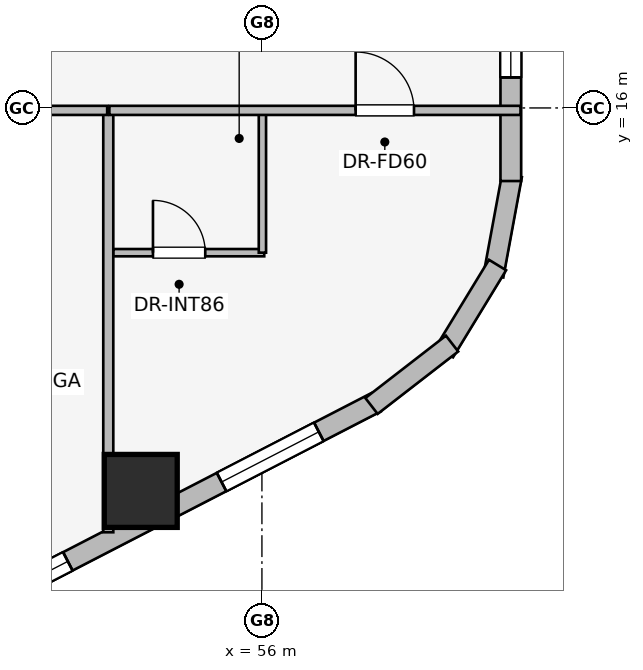
"""IFC4 building model, lengths in metres.
Left out: names, types, materials, properties, quantities, classifications, styles, units other than length and angle.
Written with IfcOpenShell. Run it as: python <this file> out.ifc"""

import sys

from ifc_helpers import new_model, si_unit, direction, frame, frame_2d, origin, origin_2d, place, context, subcontext, project, spatial, rectangle, extrude, element, fill, save


model = new_model("IFC4")
c1 = context("Model", 3, precision=1e-05, world=origin(), true_north=direction((0.0, 1.0)))
c2 = subcontext(c1, "Body", "Model", "MODEL_VIEW")
j1 = project(units=[si_unit("LENGTHUNIT", "METRE"), si_unit("PLANEANGLEUNIT", "RADIAN")], contexts=[c1])
p1 = place(None, origin())
s1 = spatial("IfcSite", under=j1, at=p1, CompositionType="ELEMENT")
p2 = place(p1, origin())
s2 = spatial("IfcBuilding", under=s1, at=p2, CompositionType="ELEMENT")
p3 = place(p2, frame((0.0, 0.0, 85.4)))
s3 = spatial("IfcBuildingStorey", under=s2, at=p3, CompositionType="ELEMENT", Elevation=85.4)
p4 = place(p3, frame((54.007, 9.702, 0.0), z_axis=(0.0, 0.0, 1.0), x_axis=(1.0, 0.0, 0.0)))
e1 = element("IfcColumn", 1, at=p4, inside=s3, PredefinedType="COLUMN", context=c2, shape_type="SweptSolid", body=[
    extrude(rectangle(XDim=1.2, YDim=1.2, at=origin_2d()), origin(), (0.0, 0.0, 1.0), 3.65),
])
p5 = place(p3, frame((57.876, 11.159, 0.0), z_axis=(0.0, 0.0, 1.0), x_axis=(-0.888634413993, -0.458616264721, 0.0)))
e2 = element("IfcWall", 2, at=p5, inside=s3, PredefinedType="STANDARD", context=c2, shape_type="SweptSolid", body=[
    extrude(rectangle(XDim=20.531, YDim=0.34, at=frame_2d((10.266, 0.0))), origin(), (0.0, 0.0, 1.0), 2.684),
])
p6 = place(p5, frame((1.058, 0.0, 0.75)))
e3 = element("IfcOpeningElement", 3, at=p6, cuts=e2, PredefinedType="OPENING", context=c2, shape_type="SweptSolid", body=[
    extrude(rectangle(XDim=1.8, YDim=1.5, at=frame_2d((0.9, 0.75))), frame((0.0, 0.18, 0.0), z_axis=(0.0, -1.0, 0.0), x_axis=(1.0, 0.0, 0.0)), (0.0, 0.0, 1.0), 0.36),
])
p7 = place(p5, frame((5.703, 0.0, 0.75)))
e4 = element("IfcOpeningElement", 4, at=p7, cuts=e2, PredefinedType="OPENING", context=c2, shape_type="SweptSolid", body=[
    extrude(rectangle(XDim=1.5, YDim=1.5, at=frame_2d((0.75, 0.75))), frame((0.0, 0.18, 0.0), z_axis=(0.0, -1.0, 0.0), x_axis=(1.0, 0.0, 0.0)), (0.0, 0.0, 1.0), 0.36),
])
p8 = place(p5, frame((8.099, 0.0, 0.75)))
e5 = element("IfcOpeningElement", 5, at=p8, cuts=e2, PredefinedType="OPENING", context=c2, shape_type="SweptSolid", body=[
    extrude(rectangle(XDim=1.5, YDim=1.5, at=frame_2d((0.75, 0.75))), frame((0.0, 0.18, 0.0), z_axis=(0.0, -1.0, 0.0), x_axis=(1.0, 0.0, 0.0)), (0.0, 0.0, 1.0), 0.36),
])
p9 = place(p5, frame((10.495, 0.0, 0.75)))
e6 = element("IfcOpeningElement", 6, at=p9, cuts=e2, PredefinedType="OPENING", context=c2, shape_type="SweptSolid", body=[
    extrude(rectangle(XDim=1.5, YDim=1.5, at=frame_2d((0.75, 0.75))), frame((0.0, 0.18, 0.0), z_axis=(0.0, -1.0, 0.0), x_axis=(1.0, 0.0, 0.0)), (0.0, 0.0, 1.0), 0.36),
])
p10 = place(p5, frame((13.526, 0.0, 0.75)))
e7 = element("IfcOpeningElement", 7, at=p10, cuts=e2, PredefinedType="OPENING", context=c2, shape_type="SweptSolid", body=[
    extrude(rectangle(XDim=1.8, YDim=1.5, at=frame_2d((0.9, 0.75))), frame((0.0, 0.18, 0.0), z_axis=(0.0, -1.0, 0.0), x_axis=(1.0, 0.0, 0.0)), (0.0, 0.0, 1.0), 0.36),
])
p11 = place(p5, frame((17.823, 0.0, 0.75)))
e8 = element("IfcOpeningElement", 8, at=p11, cuts=e2, PredefinedType="OPENING", context=c2, shape_type="SweptSolid", body=[
    extrude(rectangle(XDim=1.5, YDim=1.5, at=frame_2d((0.75, 0.75))), frame((0.0, 0.18, 0.0), z_axis=(0.0, -1.0, 0.0), x_axis=(1.0, 0.0, 0.0)), (0.0, 0.0, 1.0), 0.36),
])
p12 = place(p3, frame((60.113, 14.892, 0.0), z_axis=(0.0, 0.0, 1.0), x_axis=(-0.181714143354, -0.983351397063, 0.0)))
e9 = element("IfcWall", 9, at=p12, inside=s3, PredefinedType="STANDARD", context=c2, shape_type="SweptSolid", body=[
    extrude(rectangle(XDim=1.678, YDim=0.33, at=frame_2d((0.839, 0.0))), origin(), (0.0, 0.0, 1.0), 3.39),
])
p13 = place(p3, frame((59.875, 13.417, 0.0), z_axis=(0.0, 0.0, 1.0), x_axis=(-0.520584129191, -0.853810379671, 0.0)))
e10 = element("IfcWall", 10, at=p13, inside=s3, PredefinedType="STANDARD", context=c2, shape_type="SweptSolid", body=[
    extrude(rectangle(XDim=1.677, YDim=0.33, at=frame_2d((0.838, 0.0))), origin(), (0.0, 0.0, 1.0), 3.39),
])
p14 = place(p3, frame((59.127, 12.125, 0.0), z_axis=(0.0, 0.0, 1.0), x_axis=(-0.790691856293, -0.61221433207, 0.0)))
e11 = element("IfcWall", 11, at=p14, inside=s3, PredefinedType="STANDARD", context=c2, shape_type="SweptSolid", body=[
    extrude(rectangle(XDim=1.676, YDim=0.33, at=frame_2d((0.838, 0.0))), origin(), (0.0, 0.0, 1.0), 3.39),
])
p15 = place(p3, frame((60.093, 33.202, 0.0), z_axis=(0.0, 0.0, 1.0), x_axis=(0.0, -1.0, 0.0)))
e12 = element("IfcWall", 12, at=p15, inside=s3, PredefinedType="STANDARD", context=c2, shape_type="SweptSolid", body=[
    extrude(rectangle(XDim=18.404, YDim=0.34, at=frame_2d((9.202, 0.0))), origin(), (0.0, 0.0, 1.0), 2.684),
])
p16 = place(p15, frame((1.744, 0.0, 0.75)))
e13 = element("IfcOpeningElement", 13, at=p16, cuts=e12, PredefinedType="OPENING", context=c2, shape_type="SweptSolid", body=[
    extrude(rectangle(XDim=1.05, YDim=1.4, at=frame_2d((0.525, 0.7))), frame((0.0, 0.18, 0.0), z_axis=(0.0, -1.0, 0.0), x_axis=(1.0, 0.0, 0.0)), (0.0, 0.0, 1.0), 0.36),
])
p17 = place(p15, frame((5.265, 0.0, 0.75)))
e14 = element("IfcOpeningElement", 14, at=p17, cuts=e12, PredefinedType="OPENING", context=c2, shape_type="SweptSolid", body=[
    extrude(rectangle(XDim=1.5, YDim=1.5, at=frame_2d((0.75, 0.75))), frame((0.0, 0.18, 0.0), z_axis=(0.0, -1.0, 0.0), x_axis=(1.0, 0.0, 0.0)), (0.0, 0.0, 1.0), 0.36),
])
p18 = place(p15, frame((8.452, 0.0, 0.75)))
e15 = element("IfcOpeningElement", 15, at=p18, cuts=e12, PredefinedType="OPENING", context=c2, shape_type="SweptSolid", body=[
    extrude(rectangle(XDim=1.5, YDim=1.5, at=frame_2d((0.75, 0.75))), frame((0.0, 0.18, 0.0), z_axis=(0.0, -1.0, 0.0), x_axis=(1.0, 0.0, 0.0)), (0.0, 0.0, 1.0), 0.36),
])
p19 = place(p15, frame((11.639, 0.0, 0.75)))
e16 = element("IfcOpeningElement", 16, at=p19, cuts=e12, PredefinedType="OPENING", context=c2, shape_type="SweptSolid", body=[
    extrude(rectangle(XDim=1.5, YDim=1.5, at=frame_2d((0.75, 0.75))), frame((0.0, 0.18, 0.0), z_axis=(0.0, -1.0, 0.0), x_axis=(1.0, 0.0, 0.0)), (0.0, 0.0, 1.0), 0.36),
])
p20 = place(p15, frame((15.65, 0.0, 0.75)))
e17 = element("IfcOpeningElement", 17, at=p20, cuts=e12, PredefinedType="OPENING", context=c2, shape_type="SweptSolid", body=[
    extrude(rectangle(XDim=1.05, YDim=1.4, at=frame_2d((0.525, 0.7))), frame((0.0, 0.18, 0.0), z_axis=(0.0, -1.0, 0.0), x_axis=(1.0, 0.0, 0.0)), (0.0, 0.0, 1.0), 0.36),
])
p21 = place(p3, frame((53.473, 9.022, 0.0), z_axis=(0.0, 0.0, 1.0), x_axis=(0.0, 1.0, 0.0)))
e18 = element("IfcWall", 18, at=p21, inside=s3, PredefinedType="PARTITIONING", context=c2, shape_type="SweptSolid", body=[
    extrude(rectangle(XDim=6.908, YDim=0.165, at=frame_2d((3.454, 0.0))), origin(), (0.0, 0.0, 1.0), 3.39),
])
p22 = place(p3, frame((46.46, 15.96, 0.0), z_axis=(0.0, 0.0, 1.0), x_axis=(1.0, 0.0, 0.0)))
e19 = element("IfcWall", 19, at=p22, inside=s3, PredefinedType="PARTITIONING", context=c2, shape_type="SweptSolid", body=[
    extrude(rectangle(XDim=6.995, YDim=0.15, at=frame_2d((3.498, 0.0))), origin(), (0.0, 0.0, 1.0), 3.39),
])
p23 = place(p22, frame((4.153, 0.0, 0.0)))
e20 = element("IfcOpeningElement", 20, at=p23, cuts=e19, PredefinedType="OPENING", context=c2, shape_type="SweptSolid", body=[
    extrude(rectangle(XDim=0.96, YDim=2.0, at=frame_2d((0.48, 1.0))), frame((0.0, 0.085, 0.0), z_axis=(0.0, -1.0, 0.0), x_axis=(1.0, 0.0, 0.0)), (0.0, 0.0, 1.0), 0.17),
])
p24 = place(p3, frame((53.558, 13.62, 0.0), z_axis=(0.0, 0.0, 1.0), x_axis=(1.0, 0.0, 0.0)))
e21 = element("IfcWall", 21, at=p24, inside=s3, PredefinedType="PARTITIONING", context=c2, shape_type="SweptSolid", body=[
    extrude(rectangle(XDim=2.48, YDim=0.12, at=frame_2d((1.24, 0.0))), origin(), (0.0, 0.0, 1.0), 3.39),
])
p25 = place(p24, frame((0.65, 0.0, 0.0)))
e22 = element("IfcOpeningElement", 22, at=p25, cuts=e21, PredefinedType="OPENING", context=c2, shape_type="SweptSolid", body=[
    extrude(rectangle(XDim=0.86, YDim=2.0, at=frame_2d((0.43, 1.0))), frame((0.0, 0.07, 0.0), z_axis=(0.0, -1.0, 0.0), x_axis=(1.0, 0.0, 0.0)), (0.0, 0.0, 1.0), 0.14),
])
p26 = place(p3, frame((56.008, 13.62, 0.0), z_axis=(0.0, 0.0, 1.0), x_axis=(0.0, 1.0, 0.0)))
e23 = element("IfcWall", 23, at=p26, inside=s3, PredefinedType="PARTITIONING", context=c2, shape_type="SweptSolid", body=[
    extrude(rectangle(XDim=2.3, YDim=0.12, at=frame_2d((1.15, 0.0))), origin(), (0.0, 0.0, 1.0), 3.39),
])
p27 = place(p3, frame((53.491, 15.96, 0.0), z_axis=(0.0, 0.0, 1.0), x_axis=(1.0, 0.0, 0.0)))
e24 = element("IfcWall", 24, at=p27, inside=s3, PredefinedType="PARTITIONING", context=c2, shape_type="SweptSolid", body=[
    extrude(rectangle(XDim=6.762, YDim=0.15, at=frame_2d((3.381, 0.0))), origin(), (0.0, 0.0, 1.0), 3.39),
])
p28 = place(p27, frame((4.05, 0.0, 0.0)))
e25 = element("IfcOpeningElement", 25, at=p28, cuts=e24, PredefinedType="OPENING", context=c2, shape_type="SweptSolid", body=[
    extrude(rectangle(XDim=0.96, YDim=2.0, at=frame_2d((0.48, 1.0))), frame((0.0, 0.085, 0.0), z_axis=(0.0, -1.0, 0.0), x_axis=(1.0, 0.0, 0.0)), (0.0, 0.0, 1.0), 0.17),
])
p29 = place(p6, origin())
e26 = element("IfcWindow", 26, at=p29, inside=s3, PartitioningType="SINGLE_PANEL", PredefinedType="WINDOW", context=c2, shape_type="SweptSolid", body=[
    extrude(rectangle(XDim=1.8, YDim=1.5, at=frame_2d((0.9, 0.75))), frame((0.0, 0.03, 0.0), z_axis=(0.0, -1.0, 0.0), x_axis=(1.0, 0.0, 0.0)), (0.0, 0.0, 1.0), 0.06),
])
fill(e3, e26)
p30 = place(p7, origin())
e27 = element("IfcWindow", 27, at=p30, inside=s3, PartitioningType="SINGLE_PANEL", PredefinedType="WINDOW", context=c2, shape_type="SweptSolid", body=[
    extrude(rectangle(XDim=1.5, YDim=1.5, at=frame_2d((0.75, 0.75))), frame((0.0, 0.03, 0.0), z_axis=(0.0, -1.0, 0.0), x_axis=(1.0, 0.0, 0.0)), (0.0, 0.0, 1.0), 0.06),
])
fill(e4, e27)
p31 = place(p20, origin())
e28 = element("IfcWindow", 28, at=p31, inside=s3, PartitioningType="SINGLE_PANEL", PredefinedType="WINDOW", context=c2, shape_type="SweptSolid", body=[
    extrude(rectangle(XDim=1.05, YDim=1.4, at=frame_2d((0.525, 0.7))), frame((0.0, 0.03, 0.0), z_axis=(0.0, -1.0, 0.0), x_axis=(1.0, 0.0, 0.0)), (0.0, 0.0, 1.0), 0.06),
])
fill(e17, e28)
p32 = place(p25, origin())
e29 = element("IfcDoor", 29, at=p32, inside=s3, OperationType="SINGLE_SWING_LEFT", PredefinedType="DOOR", context=c2, shape_type="SweptSolid", body=[
    extrude(rectangle(XDim=0.86, YDim=2.0, at=frame_2d((0.43, 1.0))), frame((0.0, 0.025, 0.0), z_axis=(0.0, -1.0, 0.0), x_axis=(1.0, 0.0, 0.0)), (0.0, 0.0, 1.0), 0.05),
])
fill(e22, e29)
p33 = place(p28, origin())
e30 = element("IfcDoor", 30, at=p33, inside=s3, OperationType="SINGLE_SWING_LEFT", PredefinedType="DOOR", context=c2, shape_type="SweptSolid", body=[
    extrude(rectangle(XDim=0.96, YDim=2.0, at=frame_2d((0.48, 1.0))), frame((0.0, 0.025, 0.0), z_axis=(0.0, -1.0, 0.0), x_axis=(1.0, 0.0, 0.0)), (0.0, 0.0, 1.0), 0.05),
])
fill(e25, e30)
save(model, sys.argv[1])
